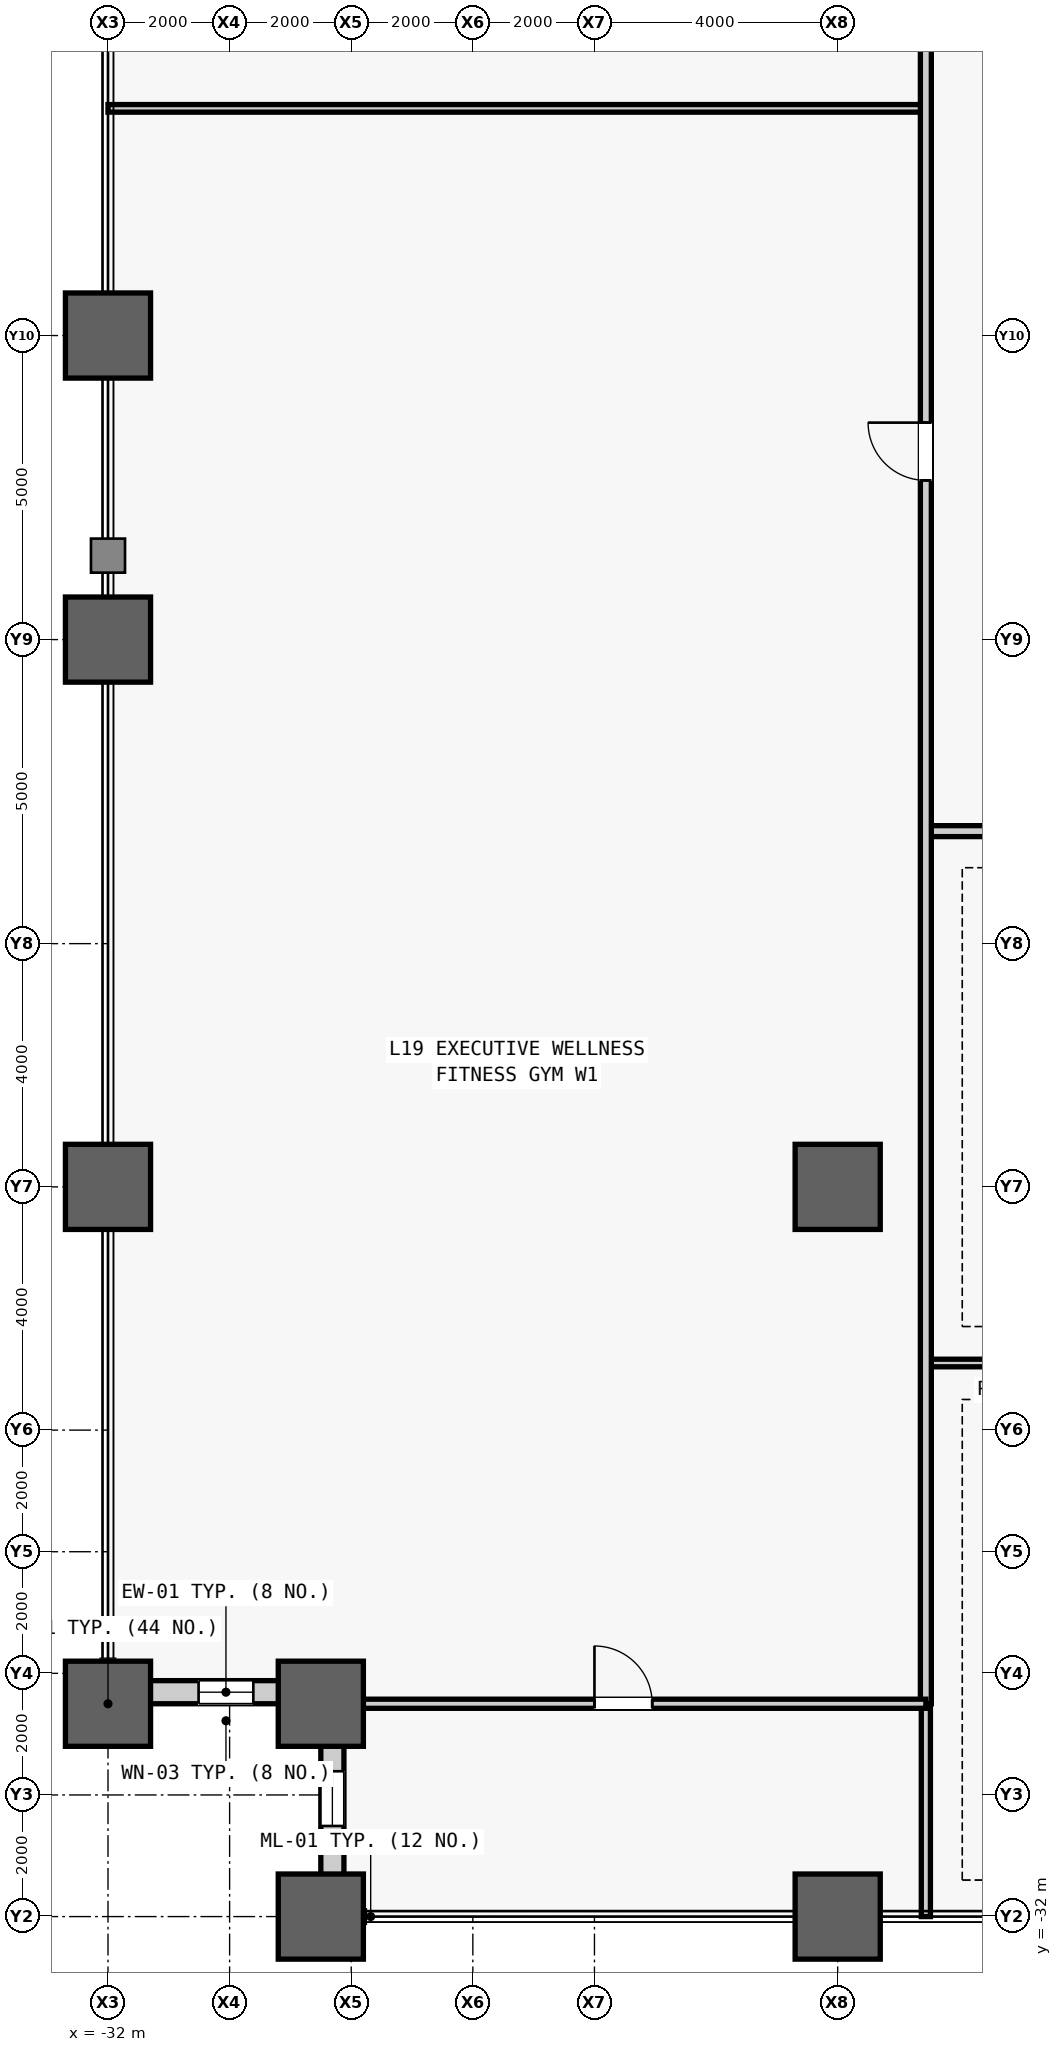
"""IFC4 building model, lengths in metres.
Left out: names, types, materials, properties, quantities, classifications, styles, units other than length and angle.
Written with IfcOpenShell. Run it as: python <this file> out.ifc"""

import sys

from ifc_helpers import new_model, si_unit, direction, frame, frame_2d, origin, origin_2d, place, context, subcontext, project, spatial, rectangle, hollow_rectangle, extrude, source, transform, mapped, element, fill, save


model = new_model("IFC4")
c1 = context("Model", 3, precision=1e-05, world=origin(), true_north=direction((0.0, 1.0)))
c2 = subcontext(c1, "Body", "Model", "MODEL_VIEW")
j1 = project(units=[si_unit("LENGTHUNIT", "METRE"), si_unit("PLANEANGLEUNIT", "RADIAN")], contexts=[c1])
p1 = place(None, origin())
s1 = spatial("IfcSite", under=j1, at=p1, CompositionType="ELEMENT")
p2 = place(p1, origin())
s2 = spatial("IfcBuilding", under=s1, at=p2, CompositionType="ELEMENT")
p3 = place(p2, frame((0.0, 0.0, 87.2)))
s3 = spatial("IfcBuildingStorey", under=s2, at=p3, CompositionType="ELEMENT", Elevation=87.2)
m1 = source(origin(), c2, "Body", "SweptSolid", [
    extrude(hollow_rectangle(XDim=1.4, YDim=1.4, WallThickness=0.075, at=origin_2d()), origin(), (0.0, 0.0, 1.0), 4.2),
])
for number, where, z_axis, x_axis in (
    (1, (-32.0, -28.5, 0.0), (0.0, 0.0, 1.0), (1.0, 0.0, 0.0)),
    (2, (-32.0, -20.0, 0.0), (0.0, 0.0, 1.0), (1.0, 0.0, 0.0)),
    (3, (-32.0, -11.0, 0.0), (0.0, 0.0, 1.0), (1.0, 0.0, 0.0)),
    (4, (-32.0, -6.0, 0.0), (0.0, 0.0, 1.0), (1.0, 0.0, 0.0)),
    (5, (-28.5, -32.0, 0.0), (0.0, 0.0, 1.0), (1.0, 0.0, 0.0)),
    (6, (-28.5, -28.5, 0.0), (0.0, 0.0, 1.0), (1.0, 0.0, 0.0)),
    (7, (-20.0, -32.0, 0.0), (0.0, 0.0, 1.0), (1.0, 0.0, 0.0)),
    (8, (-20.0, -20.0, 0.0), (0.0, 0.0, 1.0), (1.0, 0.0, 0.0)),
):
    element("IfcColumn", number, at=place(p3, frame(where, z_axis=z_axis, x_axis=x_axis)), inside=s3, PredefinedType="COLUMN", context=c2, shape_type="MappedRepresentation", body=[
        mapped(m1, transform((0.0, 0.0, 0.0), scale=1.0)),
    ])
m2 = source(origin(), c2, "Body", "SweptSolid", [
    extrude(rectangle(XDim=3.12, YDim=0.38, at=frame_2d((1.56, 0.0))), origin(), (0.0, 0.0, 1.0), 3.245),
])
p4 = place(p3, frame((-28.5, -28.31, 0.0), z_axis=(0.0, 0.0, 1.0), x_axis=(-1.0, 0.0, 0.0)))
e9 = element("IfcWall", 9, at=p4, inside=s3, PredefinedType="STANDARD", context=c2, shape_type="MappedRepresentation", body=[
    mapped(m2, transform((0.0, 0.0, 0.0), scale=1.0)),
])
m3 = source(origin(), c2, "Body", "SweptSolid", [
    extrude(rectangle(XDim=0.9, YDim=2.4, at=frame_2d((0.45, 1.2))), frame((0.0, 0.2, 0.0), z_axis=(0.0, -1.0, 0.0), x_axis=(1.0, 0.0, 0.0)), (0.0, 0.0, 1.0), 0.4),
])
p5 = place(p4, frame((1.11, 0.0, 0.5)))
e10 = element("IfcOpeningElement", 10, at=p5, cuts=e9, PredefinedType="OPENING", context=c2, shape_type="MappedRepresentation", body=[
    mapped(m3, transform((0.0, 0.0, 0.0), scale=1.0)),
])
m4 = source(origin(), c2, "Body", "SweptSolid", [
    extrude(rectangle(XDim=3.12, YDim=0.38, at=frame_2d((1.56, 0.0))), origin(), (0.0, 0.0, 1.0), 2.54),
])
p6 = place(p3, frame((-28.31, -31.62, 0.0), z_axis=(0.0, 0.0, 1.0), x_axis=(0.0, 1.0, 0.0)))
e11 = element("IfcWall", 11, at=p6, inside=s3, PredefinedType="STANDARD", context=c2, shape_type="MappedRepresentation", body=[
    mapped(m4, transform((0.0, 0.0, 0.0), scale=1.0)),
])
m5 = source(origin(), c2, "Body", "SweptSolid", [
    extrude(rectangle(XDim=0.9, YDim=1.82, at=frame_2d((0.45, 0.91))), frame((0.0, 0.2, 0.0), z_axis=(0.0, -1.0, 0.0), x_axis=(1.0, 0.0, 0.0)), (0.0, 0.0, 1.0), 0.4),
])
p7 = place(p6, frame((1.11, 0.0, 0.5)))
e12 = element("IfcOpeningElement", 12, at=p7, cuts=e11, PredefinedType="OPENING", context=c2, shape_type="MappedRepresentation", body=[
    mapped(m5, transform((0.0, 0.0, 0.0), scale=1.0)),
])
m6 = source(origin(), c2, "Body", "SweptSolid", [
    extrude(rectangle(XDim=6.831, YDim=0.125, at=frame_2d((3.416, 0.0))), origin(), (0.0, 0.0, 1.0), 3.94),
])
p8 = place(p3, frame((-18.55, -22.896, 0.0), z_axis=(0.0, 0.0, 1.0), x_axis=(1.0, 0.0, 0.0)))
e13 = element("IfcWall", 13, at=p8, inside=s3, PredefinedType="PARTITIONING", context=c2, shape_type="MappedRepresentation", body=[
    mapped(m6, transform((0.0, 0.0, 0.0), scale=1.0)),
])
m7 = source(origin(), c2, "Body", "SweptSolid", [
    extrude(rectangle(XDim=0.95, YDim=2.15, at=frame_2d((0.475, 1.075))), frame((0.0, 0.073, 0.0), z_axis=(0.0, -1.0, 0.0), x_axis=(1.0, 0.0, 0.0)), (0.0, 0.0, 1.0), 0.145),
])
p9 = place(p8, frame((2.94, 0.0, 0.0)))
e14 = element("IfcOpeningElement", 14, at=p9, cuts=e13, PredefinedType="OPENING", context=c2, shape_type="MappedRepresentation", body=[
    mapped(m7, transform((0.0, 0.0, 0.0), scale=1.0)),
])
m8 = source(origin(), c2, "Body", "SweptSolid", [
    extrude(rectangle(XDim=37.95, YDim=0.18, at=frame_2d((18.975, 0.0))), origin(), (0.0, 0.0, 1.0), 3.94),
])
p10 = place(p3, frame((-18.55, -14.15, 0.0), z_axis=(0.0, 0.0, 1.0), x_axis=(1.0, 0.0, 0.0)))
e15 = element("IfcWall", 15, at=p10, inside=s3, PredefinedType="PARTITIONING", context=c2, shape_type="MappedRepresentation", body=[
    mapped(m8, transform((0.0, 0.0, 0.0), scale=1.0)),
])
m9 = source(origin(), c2, "Body", "SweptSolid", [
    extrude(rectangle(XDim=1.05, YDim=2.2, at=frame_2d((0.525, 1.1))), frame((0.0, 0.1, 0.0), z_axis=(0.0, -1.0, 0.0), x_axis=(1.0, 0.0, 0.0)), (0.0, 0.0, 1.0), 0.2),
])
p11 = place(p10, frame((4.966, 0.0, 0.0)))
e16 = element("IfcOpeningElement", 16, at=p11, cuts=e15, PredefinedType="OPENING", context=c2, shape_type="MappedRepresentation", body=[
    mapped(m9, transform((0.0, 0.0, 0.0), scale=1.0)),
])
p12 = place(p10, frame((10.291, 0.0, 0.0)))
e17 = element("IfcOpeningElement", 17, at=p12, cuts=e15, PredefinedType="OPENING", context=c2, shape_type="MappedRepresentation", body=[
    mapped(m9, transform((0.0, 0.0, 0.0), scale=1.0)),
])
p13 = place(p10, frame((18.64, 0.0, 0.0)))
e18 = element("IfcOpeningElement", 18, at=p13, cuts=e15, PredefinedType="OPENING", context=c2, shape_type="MappedRepresentation", body=[
    mapped(m9, transform((0.0, 0.0, 0.0), scale=1.0)),
])
p14 = place(p10, frame((27.178, 0.0, 0.0)))
e19 = element("IfcOpeningElement", 19, at=p14, cuts=e15, PredefinedType="OPENING", context=c2, shape_type="MappedRepresentation", body=[
    mapped(m9, transform((0.0, 0.0, 0.0), scale=1.0)),
])
m10 = source(origin(), c2, "Body", "SweptSolid", [
    extrude(rectangle(XDim=3.5, YDim=0.15, at=frame_2d((1.75, 0.0))), origin(), (0.0, 0.0, 1.0), 3.94),
])
p15 = place(p3, frame((-18.55, -32.0, 0.0), z_axis=(0.0, 0.0, 1.0), x_axis=(0.0, 1.0, 0.0)))
e20 = element("IfcWall", 20, at=p15, inside=s3, PredefinedType="PARTITIONING", context=c2, shape_type="MappedRepresentation", body=[
    mapped(m10, transform((0.0, 0.0, 0.0), scale=1.0)),
])
m11 = source(origin(), c2, "Body", "SweptSolid", [
    extrude(rectangle(XDim=13.45, YDim=0.125, at=frame_2d((6.725, 0.0))), origin(), (0.0, 0.0, 1.0), 3.94),
])
p16 = place(p3, frame((-32.0, -2.264, 0.0), z_axis=(0.0, 0.0, 1.0), x_axis=(1.0, 0.0, 0.0)))
e21 = element("IfcWall", 21, at=p16, inside=s3, PredefinedType="PARTITIONING", context=c2, shape_type="MappedRepresentation", body=[
    mapped(m11, transform((0.0, 0.0, 0.0), scale=1.0)),
])
m12 = source(origin(), c2, "Body", "SweptSolid", [
    extrude(rectangle(XDim=57.0, YDim=0.18, at=frame_2d((28.5, 0.0))), origin(), (0.0, 0.0, 1.0), 3.94),
])
p17 = place(p3, frame((-18.55, -28.5, 0.0), z_axis=(0.0, 0.0, 1.0), x_axis=(0.0, 1.0, 0.0)))
e22 = element("IfcWall", 22, at=p17, inside=s3, PredefinedType="PARTITIONING", context=c2, shape_type="MappedRepresentation", body=[
    mapped(m12, transform((0.0, 0.0, 0.0), scale=1.0)),
])
m13 = source(origin(), c2, "Body", "SweptSolid", [
    extrude(rectangle(XDim=0.95, YDim=2.15, at=frame_2d((0.475, 1.075))), frame((0.0, 0.1, 0.0), z_axis=(0.0, -1.0, 0.0), x_axis=(1.0, 0.0, 0.0)), (0.0, 0.0, 1.0), 0.2),
])
p18 = place(p17, frame((20.118, 0.0, 0.0)))
e23 = element("IfcOpeningElement", 23, at=p18, cuts=e22, PredefinedType="OPENING", context=c2, shape_type="MappedRepresentation", body=[
    mapped(m13, transform((0.0, 0.0, 0.0), scale=1.0)),
])
p19 = place(p17, frame((33.668, 0.0, 0.0)))
e24 = element("IfcOpeningElement", 24, at=p19, cuts=e22, PredefinedType="OPENING", context=c2, shape_type="MappedRepresentation", body=[
    mapped(m13, transform((0.0, 0.0, 0.0), scale=1.0)),
])
m14 = source(origin(), c2, "Body", "SweptSolid", [
    extrude(rectangle(XDim=9.95, YDim=0.15, at=frame_2d((4.975, 0.0))), origin(), (0.0, 0.0, 1.0), 3.94),
])
p20 = place(p3, frame((-28.5, -28.5, 0.0), z_axis=(0.0, 0.0, 1.0), x_axis=(1.0, 0.0, 0.0)))
e25 = element("IfcWall", 25, at=p20, inside=s3, PredefinedType="PARTITIONING", context=c2, shape_type="MappedRepresentation", body=[
    mapped(m14, transform((0.0, 0.0, 0.0), scale=1.0)),
])
m15 = source(origin(), c2, "Body", "SweptSolid", [
    extrude(rectangle(XDim=0.95, YDim=2.15, at=frame_2d((0.475, 1.075))), frame((0.0, 0.085, 0.0), z_axis=(0.0, -1.0, 0.0), x_axis=(1.0, 0.0, 0.0)), (0.0, 0.0, 1.0), 0.17),
])
p21 = place(p20, frame((4.5, 0.0, 0.0)))
e26 = element("IfcOpeningElement", 26, at=p21, cuts=e25, PredefinedType="OPENING", context=c2, shape_type="MappedRepresentation", body=[
    mapped(m15, transform((0.0, 0.0, 0.0), scale=1.0)),
])
m16 = source(origin(), c2, "Body", "SweptSolid", [
    extrude(rectangle(XDim=0.9, YDim=2.4, at=frame_2d((0.45, 1.2))), frame((0.0, 0.03, 0.0), z_axis=(0.0, -1.0, 0.0), x_axis=(1.0, 0.0, 0.0)), (0.0, 0.0, 1.0), 0.06),
])
p22 = place(p5, origin())
e27 = element("IfcWindow", 27, at=p22, inside=s3, PartitioningType="SINGLE_PANEL", PredefinedType="WINDOW", context=c2, shape_type="MappedRepresentation", body=[
    mapped(m16, transform((0.0, 0.0, 0.0), scale=1.0)),
])
fill(e10, e27)
m17 = source(origin(), c2, "Body", "SweptSolid", [
    extrude(rectangle(XDim=0.9, YDim=1.82, at=frame_2d((0.45, 0.91))), frame((0.0, 0.03, 0.0), z_axis=(0.0, -1.0, 0.0), x_axis=(1.0, 0.0, 0.0)), (0.0, 0.0, 1.0), 0.06),
])
p23 = place(p7, origin())
e28 = element("IfcWindow", 28, at=p23, inside=s3, PartitioningType="SINGLE_PANEL", PredefinedType="WINDOW", context=c2, shape_type="MappedRepresentation", body=[
    mapped(m17, transform((0.0, 0.0, 0.0), scale=1.0)),
])
fill(e12, e28)
m18 = source(origin(), c2, "Body", "SweptSolid", [
    extrude(rectangle(XDim=0.95, YDim=2.15, at=frame_2d((0.475, 1.075))), frame((0.0, 0.025, 0.0), z_axis=(0.0, -1.0, 0.0), x_axis=(1.0, 0.0, 0.0)), (0.0, 0.0, 1.0), 0.05),
])
p24 = place(p18, origin())
e29 = element("IfcDoor", 29, at=p24, inside=s3, OperationType="SINGLE_SWING_RIGHT", PredefinedType="DOOR", context=c2, shape_type="MappedRepresentation", body=[
    mapped(m18, transform((0.0, 0.0, 0.0), scale=1.0)),
])
fill(e23, e29)
p25 = place(p21, origin())
e30 = element("IfcDoor", 30, at=p25, inside=s3, OperationType="SINGLE_SWING_LEFT", PredefinedType="DOOR", context=c2, shape_type="MappedRepresentation", body=[
    mapped(m18, transform((0.0, 0.0, 0.0), scale=1.0)),
])
fill(e26, e30)
save(model, sys.argv[1])
